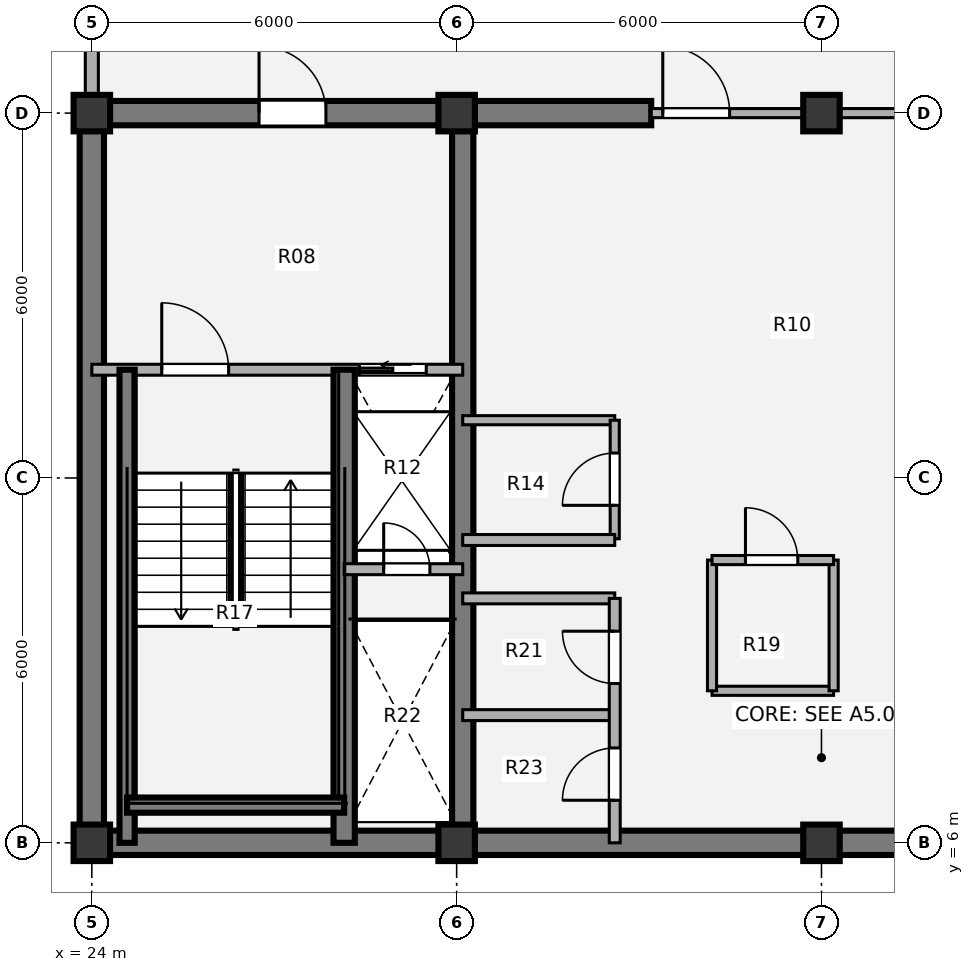
"""IFC4 building model, lengths in metres.
Left out: names, types, materials, properties, quantities, classifications, styles, units other than length and angle.
Written with IfcOpenShell. Run it as: python <this file> out.ifc"""

import sys

from ifc_helpers import new_model, si_unit, direction, frame, frame_2d, origin, origin_2d, place, context, subcontext, project, spatial, rectangle, extrude, source, transform, mapped, element, fill, save


model = new_model("IFC4")
c1 = context("Model", 3, precision=1e-05, world=origin(), true_north=direction((0.0, 1.0)))
c2 = subcontext(c1, "Body", "Model", "MODEL_VIEW")
j1 = project(units=[si_unit("LENGTHUNIT", "METRE"), si_unit("PLANEANGLEUNIT", "RADIAN")], contexts=[c1])
p1 = place(None, origin())
s1 = spatial("IfcSite", under=j1, at=p1, CompositionType="ELEMENT")
p2 = place(p1, origin())
s2 = spatial("IfcBuilding", under=s1, at=p2, CompositionType="ELEMENT")
p3 = place(p2, frame((0.0, 0.0, 287.28)))
s3 = spatial("IfcBuildingStorey", under=s2, at=p3, CompositionType="ELEMENT", Elevation=287.28)
m1 = source(origin(), c2, "Body", "SweptSolid", [
    extrude(rectangle(XDim=0.6, YDim=0.6, at=origin_2d()), origin(), (0.0, 0.0, 1.0), 3.78),
])
for number, where, z_axis, x_axis in (
    (1, (24.0, 6.0, 0.0), (0.0, 0.0, 1.0), (1.0, 0.0, 0.0)),
    (2, (30.0, 6.0, 0.0), (0.0, 0.0, 1.0), (1.0, 0.0, 0.0)),
    (3, (36.0, 6.0, 0.0), (0.0, 0.0, 1.0), (1.0, 0.0, 0.0)),
    (4, (24.0, 18.0, 0.0), (0.0, 0.0, 1.0), (1.0, 0.0, 0.0)),
    (5, (30.0, 18.0, 0.0), (0.0, 0.0, 1.0), (1.0, 0.0, 0.0)),
    (6, (36.0, 18.0, 0.0), (0.0, 0.0, 1.0), (1.0, 0.0, 0.0)),
):
    element("IfcColumn", number, at=place(p3, frame(where, z_axis=z_axis, x_axis=x_axis)), inside=s3, PredefinedType="COLUMN", context=c2, shape_type="MappedRepresentation", body=[
        mapped(m1, transform((0.0, 0.0, 0.0), x_axis=(1.0, 0.0, 0.0), y_axis=(0.0, 1.0, 0.0), z_axis=(0.0, 0.0, 1.0), scale=1.0)),
    ])
p4 = place(p3, frame((48.2, 6.0, 0.0), z_axis=(0.0, 0.0, 1.0), x_axis=(-1.0, 0.0, 0.0)))
e7 = element("IfcWall", 7, at=p4, inside=s3, PredefinedType="SHEAR", context=c2, shape_type="SweptSolid", body=[
    extrude(rectangle(XDim=24.4, YDim=0.4, at=frame_2d((12.2, 0.0))), origin(), (0.0, 0.0, 1.0), 3.78),
])
p5 = place(p3, frame((24.0, 6.0, 0.0), z_axis=(0.0, 0.0, 1.0), x_axis=(0.0, 1.0, 0.0)))
e8 = element("IfcWall", 8, at=p5, inside=s3, PredefinedType="SHEAR", context=c2, shape_type="SweptSolid", body=[
    extrude(rectangle(XDim=12.0, YDim=0.4, at=frame_2d((6.0, 0.0))), origin(), (0.0, 0.0, 1.0), 3.78),
])
p6 = place(p3, frame((23.8, 18.0, 0.0), z_axis=(0.0, 0.0, 1.0), x_axis=(1.0, 0.0, 0.0)))
e9 = element("IfcWall", 9, at=p6, inside=s3, PredefinedType="SHEAR", context=c2, shape_type="SweptSolid", body=[
    extrude(rectangle(XDim=9.4, YDim=0.4, at=frame_2d((4.7, 0.0))), origin(), (0.0, 0.0, 1.0), 3.78),
])
p7 = place(p6, frame((2.95, 0.0, 0.0)))
e10 = element("IfcOpeningElement", 10, at=p7, cuts=e9, PredefinedType="OPENING", context=c2, shape_type="SweptSolid", body=[
    extrude(rectangle(XDim=1.1, YDim=2.1, at=origin_2d()), frame((0.55, 0.21, 1.05), z_axis=(0.0, -1.0, 0.0), x_axis=(1.0, 0.0, 0.0)), (0.0, 0.0, 1.0), 0.42),
])
p8 = place(p3, frame((30.1, 6.0, 0.0), z_axis=(0.0, 0.0, 1.0), x_axis=(0.0, 1.0, 0.0)))
e11 = element("IfcWall", 11, at=p8, inside=s3, PredefinedType="SHEAR", context=c2, shape_type="SweptSolid", body=[
    extrude(rectangle(XDim=12.0, YDim=0.35, at=frame_2d((6.0, 0.0))), origin(), (0.0, 0.0, 1.0), 3.78),
])
p9 = place(p3, frame((24.0, 18.28, 0.0), z_axis=(0.0, 0.0, 1.0), x_axis=(0.0, 1.0, 0.0)))
e12 = element("IfcWall", 12, at=p9, inside=s3, PredefinedType="SOLIDWALL", context=c2, shape_type="SweptSolid", body=[
    extrude(rectangle(XDim=2.77, YDim=0.215, at=frame_2d((1.385, 0.0))), origin(), (0.0, 0.0, 1.0), 2.648),
])
p10 = place(p3, frame((30.1, 12.95, 0.0), z_axis=(0.0, 0.0, 1.0), x_axis=(1.0, 0.0, 0.0)))
e13 = element("IfcWall", 13, at=p10, inside=s3, PredefinedType="PARTITIONING", context=c2, shape_type="SweptSolid", body=[
    extrude(rectangle(XDim=2.5, YDim=0.15, at=frame_2d((1.25, 0.0))), origin(), (0.0, 0.0, 1.0), 3.43),
])
p11 = place(p3, frame((32.6, 11.0, 0.0), z_axis=(0.0, 0.0, 1.0), x_axis=(0.0, 1.0, 0.0)))
e14 = element("IfcWall", 14, at=p11, inside=s3, PredefinedType="PARTITIONING", context=c2, shape_type="SweptSolid", body=[
    extrude(rectangle(XDim=1.95, YDim=0.15, at=frame_2d((0.975, 0.0))), origin(), (0.0, 0.0, 1.0), 3.43),
])
p12 = place(p11, frame((0.55, 0.0, 0.0)))
e15 = element("IfcOpeningElement", 15, at=p12, cuts=e14, PredefinedType="OPENING", context=c2, shape_type="SweptSolid", body=[
    extrude(rectangle(XDim=0.86, YDim=2.1, at=origin_2d()), frame((0.43, 0.085, 1.05), z_axis=(0.0, -1.0, 0.0), x_axis=(1.0, 0.0, 0.0)), (0.0, 0.0, 1.0), 0.17),
])
p13 = place(p3, frame((34.2, 8.5, 0.0), z_axis=(0.0, 0.0, 1.0), x_axis=(1.0, 0.0, 0.0)))
e16 = element("IfcWall", 16, at=p13, inside=s3, PredefinedType="PARTITIONING", context=c2, shape_type="SweptSolid", body=[
    extrude(rectangle(XDim=2.0, YDim=0.15, at=frame_2d((1.0, 0.0))), origin(), (0.0, 0.0, 1.0), 3.43),
])
p14 = place(p3, frame((34.2, 8.5, 0.0), z_axis=(0.0, 0.0, 1.0), x_axis=(0.0, 1.0, 0.0)))
e17 = element("IfcWall", 17, at=p14, inside=s3, PredefinedType="PARTITIONING", context=c2, shape_type="SweptSolid", body=[
    extrude(rectangle(XDim=2.15, YDim=0.15, at=frame_2d((1.075, 0.0))), origin(), (0.0, 0.0, 1.0), 3.43),
])
p15 = place(p3, frame((36.2, 8.5, 0.0), z_axis=(0.0, 0.0, 1.0), x_axis=(0.0, 1.0, 0.0)))
e18 = element("IfcWall", 18, at=p15, inside=s3, PredefinedType="PARTITIONING", context=c2, shape_type="SweptSolid", body=[
    extrude(rectangle(XDim=2.15, YDim=0.15, at=frame_2d((1.075, 0.0))), origin(), (0.0, 0.0, 1.0), 2.645),
])
p16 = place(p3, frame((34.2, 10.65, 0.0), z_axis=(0.0, 0.0, 1.0), x_axis=(1.0, 0.0, 0.0)))
e19 = element("IfcWall", 19, at=p16, inside=s3, PredefinedType="PARTITIONING", context=c2, shape_type="SweptSolid", body=[
    extrude(rectangle(XDim=2.0, YDim=0.15, at=frame_2d((1.0, 0.0))), origin(), (0.0, 0.0, 1.0), 3.43),
])
p17 = place(p16, frame((0.55, 0.0, 0.0)))
e20 = element("IfcOpeningElement", 20, at=p17, cuts=e19, PredefinedType="OPENING", context=c2, shape_type="SweptSolid", body=[
    extrude(rectangle(XDim=0.86, YDim=2.1, at=origin_2d()), frame((0.43, 0.085, 1.05), z_axis=(0.0, -1.0, 0.0), x_axis=(1.0, 0.0, 0.0)), (0.0, 0.0, 1.0), 0.17),
])
for number, where, z_axis, x_axis in (
    (21, (30.1, 10.98, 0.0), (0.0, 0.0, 1.0), (1.0, 0.0, 0.0)),
    (22, (30.1, 8.1, 0.0), (0.0, 0.0, 1.0), (1.0, 0.0, 0.0)),
    (23, (30.1, 10.02, 0.0), (0.0, 0.0, 1.0), (1.0, 0.0, 0.0)),
):
    element("IfcWall", number, at=place(p3, frame(where, z_axis=z_axis, x_axis=x_axis)), inside=s3, PredefinedType="PARTITIONING", context=c2, shape_type="SweptSolid", body=[
        extrude(rectangle(XDim=2.5, YDim=0.18, at=frame_2d((1.25, 0.0))), origin(), (0.0, 0.0, 1.0), 3.43),
    ])
p18 = place(p3, frame((32.6, 6.0, 0.0), z_axis=(0.0, 0.0, 1.0), x_axis=(0.0, 1.0, 0.0)))
e24 = element("IfcWall", 24, at=p18, inside=s3, PredefinedType="PARTITIONING", context=c2, shape_type="SweptSolid", body=[
    extrude(rectangle(XDim=4.02, YDim=0.18, at=frame_2d((2.01, 0.0))), origin(), (0.0, 0.0, 1.0), 3.43),
])
p19 = place(p18, frame((0.7, 0.0, 0.0)))
e25 = element("IfcOpeningElement", 25, at=p19, cuts=e24, PredefinedType="OPENING", context=c2, shape_type="SweptSolid", body=[
    extrude(rectangle(XDim=0.86, YDim=2.1, at=origin_2d()), frame((0.43, 0.1, 1.05), z_axis=(0.0, -1.0, 0.0), x_axis=(1.0, 0.0, 0.0)), (0.0, 0.0, 1.0), 0.2),
])
p20 = place(p18, frame((2.62, 0.0, 0.0)))
e26 = element("IfcOpeningElement", 26, at=p20, cuts=e24, PredefinedType="OPENING", context=c2, shape_type="SweptSolid", body=[
    extrude(rectangle(XDim=0.86, YDim=2.1, at=origin_2d()), frame((0.43, 0.1, 1.05), z_axis=(0.0, -1.0, 0.0), x_axis=(1.0, 0.0, 0.0)), (0.0, 0.0, 1.0), 0.2),
])
p21 = place(p3, frame((33.2, 18.0, 0.0), z_axis=(0.0, 0.0, 1.0), x_axis=(1.0, 0.0, 0.0)))
e27 = element("IfcWall", 27, at=p21, inside=s3, PredefinedType="PARTITIONING", context=c2, shape_type="SweptSolid", body=[
    extrude(rectangle(XDim=5.6, YDim=0.15, at=frame_2d((2.8, 0.0))), origin(), (0.0, 0.0, 1.0), 2.445),
])
p22 = place(p21, frame((0.19, 0.0, 0.0)))
e28 = element("IfcOpeningElement", 28, at=p22, cuts=e27, PredefinedType="OPENING", context=c2, shape_type="SweptSolid", body=[
    extrude(rectangle(XDim=1.1, YDim=2.1, at=origin_2d()), frame((0.55, 0.085, 1.05), z_axis=(0.0, -1.0, 0.0), x_axis=(1.0, 0.0, 0.0)), (0.0, 0.0, 1.0), 0.17),
])
p23 = place(p21, frame((4.31, 0.0, 0.0)))
e29 = element("IfcOpeningElement", 29, at=p23, cuts=e27, PredefinedType="OPENING", context=c2, shape_type="SweptSolid", body=[
    extrude(rectangle(XDim=1.1, YDim=2.1, at=origin_2d()), frame((0.55, 0.085, 1.05), z_axis=(0.0, -1.0, 0.0), x_axis=(1.0, 0.0, 0.0)), (0.0, 0.0, 1.0), 0.17),
])
p24 = place(p3, frame((24.0, 13.78, 0.0), z_axis=(0.0, 0.0, 1.0), x_axis=(1.0, 0.0, 0.0)))
e30 = element("IfcWall", 30, at=p24, inside=s3, PredefinedType="PARTITIONING", context=c2, shape_type="SweptSolid", body=[
    extrude(rectangle(XDim=6.1, YDim=0.18, at=frame_2d((3.05, 0.0))), origin(), (0.0, 0.0, 1.0), 3.43),
])
p25 = place(p24, frame((1.15, 0.0, 0.0)))
e31 = element("IfcOpeningElement", 31, at=p25, cuts=e30, PredefinedType="OPENING", context=c2, shape_type="SweptSolid", body=[
    extrude(rectangle(XDim=1.1, YDim=2.1, at=origin_2d()), frame((0.55, 0.1, 1.05), z_axis=(0.0, -1.0, 0.0), x_axis=(1.0, 0.0, 0.0)), (0.0, 0.0, 1.0), 0.2),
])
p26 = place(p24, frame((4.4, 0.0, 0.0)))
e32 = element("IfcOpeningElement", 32, at=p26, cuts=e30, PredefinedType="OPENING", context=c2, shape_type="SweptSolid", body=[
    extrude(rectangle(XDim=1.1, YDim=2.1, at=origin_2d()), frame((0.55, 0.1, 1.05), z_axis=(0.0, -1.0, 0.0), x_axis=(1.0, 0.0, 0.0)), (0.0, 0.0, 1.0), 0.2),
])
p27 = place(p3, frame((28.15, 6.0, 0.0), z_axis=(0.0, 0.0, 1.0), x_axis=(0.0, 1.0, 0.0)))
e33 = element("IfcWall", 33, at=p27, inside=s3, PredefinedType="SHEAR", context=c2, shape_type="SweptSolid", body=[
    extrude(rectangle(XDim=7.78, YDim=0.35, at=frame_2d((3.89, 0.0))), origin(), (0.0, 0.0, 1.0), 3.78),
])
p28 = place(p3, frame((24.58, 6.0, 0.0), z_axis=(0.0, 0.0, 1.0), x_axis=(0.0, 1.0, 0.0)))
e34 = element("IfcWall", 34, at=p28, inside=s3, PredefinedType="SHEAR", context=c2, shape_type="SweptSolid", body=[
    extrude(rectangle(XDim=7.78, YDim=0.25, at=frame_2d((3.89, 0.0))), origin(), (0.0, 0.0, 1.0), 3.78),
])
p29 = place(p3, frame((24.58, 6.62, 0.0), z_axis=(0.0, 0.0, 1.0), x_axis=(1.0, 0.0, 0.0)))
e35 = element("IfcWall", 35, at=p29, inside=s3, PredefinedType="SHEAR", context=c2, shape_type="SweptSolid", body=[
    extrude(rectangle(XDim=3.57, YDim=0.25, at=frame_2d((1.785, 0.0))), origin(), (0.0, 0.0, 1.0), 3.78),
])
p30 = place(p3, frame((28.15, 10.5, 0.0), z_axis=(0.0, 0.0, 1.0), x_axis=(1.0, 0.0, 0.0)))
e36 = element("IfcWall", 36, at=p30, inside=s3, PredefinedType="PARTITIONING", context=c2, shape_type="SweptSolid", body=[
    extrude(rectangle(XDim=1.95, YDim=0.18, at=frame_2d((0.975, 0.0))), origin(), (0.0, 0.0, 1.0), 3.43),
])
p31 = place(p30, frame((0.65, 0.0, 0.0)))
e37 = element("IfcOpeningElement", 37, at=p31, cuts=e36, PredefinedType="OPENING", context=c2, shape_type="SweptSolid", body=[
    extrude(rectangle(XDim=0.76, YDim=2.05, at=origin_2d()), frame((0.38, 0.1, 1.025), z_axis=(0.0, -1.0, 0.0), x_axis=(1.0, 0.0, 0.0)), (0.0, 0.0, 1.0), 0.2),
])
m2 = source(origin(), c2, "Body", "SweptSolid", [
    extrude(rectangle(XDim=0.86, YDim=2.1, at=origin_2d()), frame((0.43, 0.025, 1.05), z_axis=(0.0, -1.0, 0.0), x_axis=(1.0, 0.0, 0.0)), (0.0, 0.0, 1.0), 0.05),
])
p32 = place(p12, origin())
e38 = element("IfcDoor", 38, at=p32, inside=s3, OperationType="SINGLE_SWING_LEFT", PredefinedType="DOOR", context=c2, shape_type="MappedRepresentation", body=[
    mapped(m2, transform((0.0, 0.0, 0.0), x_axis=(1.0, 0.0, 0.0), y_axis=(0.0, 1.0, 0.0), z_axis=(0.0, 0.0, 1.0), scale=1.0)),
])
fill(e15, e38)
p33 = place(p17, origin())
e39 = element("IfcDoor", 39, at=p33, inside=s3, OperationType="SINGLE_SWING_LEFT", PredefinedType="DOOR", context=c2, shape_type="MappedRepresentation", body=[
    mapped(m2, transform((0.0, 0.0, 0.0), x_axis=(1.0, 0.0, 0.0), y_axis=(0.0, 1.0, 0.0), z_axis=(0.0, 0.0, 1.0), scale=1.0)),
])
fill(e20, e39)
p34 = place(p19, origin())
e40 = element("IfcDoor", 40, at=p34, inside=s3, OperationType="SINGLE_SWING_LEFT", PredefinedType="DOOR", context=c2, shape_type="MappedRepresentation", body=[
    mapped(m2, transform((0.0, 0.0, 0.0), x_axis=(1.0, 0.0, 0.0), y_axis=(0.0, 1.0, 0.0), z_axis=(0.0, 0.0, 1.0), scale=1.0)),
])
fill(e25, e40)
p35 = place(p20, origin())
e41 = element("IfcDoor", 41, at=p35, inside=s3, OperationType="SINGLE_SWING_RIGHT", PredefinedType="DOOR", context=c2, shape_type="MappedRepresentation", body=[
    mapped(m2, transform((0.0, 0.0, 0.0), x_axis=(1.0, 0.0, 0.0), y_axis=(0.0, 1.0, 0.0), z_axis=(0.0, 0.0, 1.0), scale=1.0)),
])
fill(e26, e41)
m3 = source(origin(), c2, "Body", "SweptSolid", [
    extrude(rectangle(XDim=1.1, YDim=2.1, at=origin_2d()), frame((0.55, 0.025, 1.05), z_axis=(0.0, -1.0, 0.0), x_axis=(1.0, 0.0, 0.0)), (0.0, 0.0, 1.0), 0.05),
])
p36 = place(p22, origin())
e42 = element("IfcDoor", 42, at=p36, inside=s3, OperationType="SINGLE_SWING_LEFT", PredefinedType="DOOR", context=c2, shape_type="MappedRepresentation", body=[
    mapped(m3, transform((0.0, 0.0, 0.0), x_axis=(1.0, 0.0, 0.0), y_axis=(0.0, 1.0, 0.0), z_axis=(0.0, 0.0, 1.0), scale=1.0)),
])
fill(e28, e42)
m4 = source(origin(), c2, "Body", "SweptSolid", [
    extrude(rectangle(XDim=1.1, YDim=2.1, at=origin_2d()), frame((0.55, 0.025, 1.05), z_axis=(0.0, -1.0, 0.0), x_axis=(1.0, 0.0, 0.0)), (0.0, 0.0, 1.0), 0.05),
])
p37 = place(p25, origin())
e43 = element("IfcDoor", 43, at=p37, inside=s3, OperationType="SINGLE_SWING_LEFT", PredefinedType="DOOR", context=c2, shape_type="MappedRepresentation", body=[
    mapped(m4, transform((0.0, 0.0, 0.0), x_axis=(1.0, 0.0, 0.0), y_axis=(0.0, 1.0, 0.0), z_axis=(0.0, 0.0, 1.0), scale=1.0)),
])
fill(e31, e43)
m5 = source(origin(), c2, "Body", "SweptSolid", [
    extrude(rectangle(XDim=1.1, YDim=2.1, at=origin_2d()), frame((0.55, 0.025, 1.05), z_axis=(0.0, -1.0, 0.0), x_axis=(1.0, 0.0, 0.0)), (0.0, 0.0, 1.0), 0.05),
])
p38 = place(p26, origin())
e44 = element("IfcDoor", 44, at=p38, inside=s3, OperationType="SLIDING_TO_LEFT", PredefinedType="DOOR", context=c2, shape_type="MappedRepresentation", body=[
    mapped(m5, transform((0.0, 0.0, 0.0), x_axis=(1.0, 0.0, 0.0), y_axis=(0.0, 1.0, 0.0), z_axis=(0.0, 0.0, 1.0), scale=1.0)),
])
fill(e32, e44)
m6 = source(origin(), c2, "Body", "SweptSolid", [
    extrude(rectangle(XDim=0.76, YDim=2.05, at=origin_2d()), frame((0.38, 0.025, 1.025), z_axis=(0.0, -1.0, 0.0), x_axis=(1.0, 0.0, 0.0)), (0.0, 0.0, 1.0), 0.05),
])
p39 = place(p31, origin())
e45 = element("IfcDoor", 45, at=p39, inside=s3, OperationType="SINGLE_SWING_LEFT", PredefinedType="DOOR", context=c2, shape_type="MappedRepresentation", body=[
    mapped(m6, transform((0.0, 0.0, 0.0), x_axis=(1.0, 0.0, 0.0), y_axis=(0.0, 1.0, 0.0), z_axis=(0.0, 0.0, 1.0), scale=1.0)),
])
fill(e37, e45)
p40 = place(p7, origin())
e46 = element("IfcDoor", 46, at=p40, inside=s3, OperationType="SINGLE_SWING_LEFT", PredefinedType="DOOR", context=c2, shape_type="MappedRepresentation", body=[
    mapped(m3, transform((0.0, 0.0, 0.0), x_axis=(1.0, 0.0, 0.0), y_axis=(0.0, 1.0, 0.0), z_axis=(0.0, 0.0, 1.0), scale=1.0)),
])
fill(e10, e46)
save(model, sys.argv[1])
